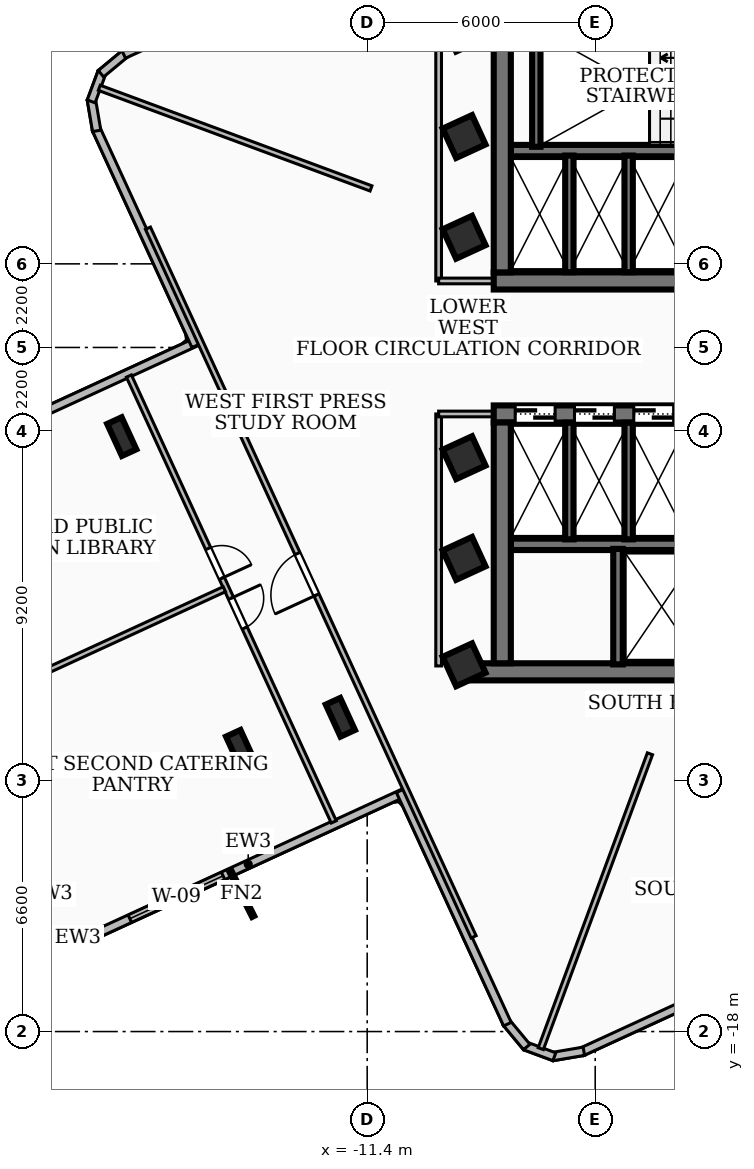
"""IFC4 building model, lengths in metres.
Left out: names, types, materials, properties, quantities, classifications, styles, units other than length and angle.
Written with IfcOpenShell. Run it as: python <this file> out.ifc"""

import sys

from ifc_helpers import new_model, si_unit, direction, frame, frame_2d, origin, origin_2d, place, context, subcontext, project, spatial, rectangle, i_section, extrude, element, fill, save


model = new_model("IFC4")
c1 = context("Model", 3, precision=1e-05, world=origin(), true_north=direction((0.0, 1.0)))
c2 = subcontext(c1, "Body", "Model", "MODEL_VIEW")
j1 = project(units=[si_unit("LENGTHUNIT", "METRE"), si_unit("PLANEANGLEUNIT", "RADIAN")], contexts=[c1])
p1 = place(None, origin())
s1 = spatial("IfcSite", under=j1, at=p1, CompositionType="ELEMENT")
p2 = place(p1, origin())
s2 = spatial("IfcBuilding", under=s1, at=p2, CompositionType="ELEMENT")
p3 = place(p2, frame((0.0, 0.0, 184.68)))
s3 = spatial("IfcBuildingStorey", under=s2, at=p3, CompositionType="ELEMENT", Elevation=184.68)
p4 = place(p3, frame((8.07, 1.75, 0.0), z_axis=(0.0, 0.0, 1.0), x_axis=(-1.0, 0.0, 0.0)))
e1 = element("IfcWall", 1, at=p4, inside=s3, PredefinedType="SHEAR", context=c2, shape_type="SweptSolid", body=[
    extrude(rectangle(XDim=16.14, YDim=0.45, at=frame_2d((8.07, 0.0))), origin(), (0.0, 0.0, 1.0), 3.34),
])
p5 = place(p4, frame((7.45, 0.0, 0.0)))
e2 = element("IfcOpeningElement", 2, at=p5, cuts=e1, PredefinedType="OPENING", context=c2, shape_type="SweptSolid", body=[
    extrude(rectangle(XDim=1.0, YDim=2.1, at=frame_2d((0.5, 1.05))), frame((0.0, 0.235, 0.0), z_axis=(0.0, -1.0, 0.0), x_axis=(1.0, 0.0, 0.0)), (0.0, 0.0, 1.0), 0.47),
])
p6 = place(p4, frame((3.4, 0.0, 0.0)))
e3 = element("IfcOpeningElement", 3, at=p6, cuts=e1, PredefinedType="OPENING", context=c2, shape_type="SweptSolid", body=[
    extrude(rectangle(XDim=0.9, YDim=2.06, at=frame_2d((0.45, 1.03))), frame((0.0, 0.235, 0.0), z_axis=(0.0, -1.0, 0.0), x_axis=(1.0, 0.0, 0.0)), (0.0, 0.0, 1.0), 0.47),
])
p7 = place(p4, frame((1.1, 0.0, 0.0)))
e4 = element("IfcOpeningElement", 4, at=p7, cuts=e1, PredefinedType="OPENING", context=c2, shape_type="SweptSolid", body=[
    extrude(rectangle(XDim=0.9, YDim=2.06, at=frame_2d((0.45, 1.03))), frame((0.0, 0.235, 0.0), z_axis=(0.0, -1.0, 0.0), x_axis=(1.0, 0.0, 0.0)), (0.0, 0.0, 1.0), 0.47),
])
p8 = place(p3, frame((-7.845, 1.975, 0.0), z_axis=(0.0, 0.0, 1.0), x_axis=(0.0, 1.0, 0.0)))
e5 = element("IfcWall", 5, at=p8, inside=s3, PredefinedType="SHEAR", context=c2, shape_type="SweptSolid", body=[
    extrude(rectangle(XDim=6.335, YDim=0.45, at=frame_2d((3.167, 0.0))), origin(), (0.0, 0.0, 1.0), 3.34),
])
p9 = place(p3, frame((7.62, 5.18, 0.0), z_axis=(0.0, 0.0, 1.0), x_axis=(-1.0, 0.0, 0.0)))
e6 = element("IfcWall", 6, at=p9, inside=s3, PredefinedType="SOLIDWALL", context=c2, shape_type="SweptSolid", body=[
    extrude(rectangle(XDim=15.24, YDim=0.3, at=frame_2d((7.62, 0.0))), origin(), (0.0, 0.0, 1.0), 3.34),
])
p10 = place(p9, frame((5.77, 0.0, 0.0)))
e7 = element("IfcOpeningElement", 7, at=p10, cuts=e6, PredefinedType="OPENING", context=c2, shape_type="SweptSolid", body=[
    extrude(rectangle(XDim=1.1, YDim=2.15, at=frame_2d((0.55, 1.075))), frame((0.0, 0.16, 0.0), z_axis=(0.0, -1.0, 0.0), x_axis=(1.0, 0.0, 0.0)), (0.0, 0.0, 1.0), 0.32),
])
p11 = place(p9, frame((2.97, 0.0, 0.0)))
e8 = element("IfcOpeningElement", 8, at=p11, cuts=e6, PredefinedType="OPENING", context=c2, shape_type="SweptSolid", body=[
    extrude(rectangle(XDim=1.1, YDim=2.15, at=frame_2d((0.55, 1.075))), frame((0.0, 0.16, 0.0), z_axis=(0.0, -1.0, 0.0), x_axis=(1.0, 0.0, 0.0)), (0.0, 0.0, 1.0), 0.32),
])
p12 = place(p9, frame((7.97, 0.0, 0.0)))
e9 = element("IfcOpeningElement", 9, at=p12, cuts=e6, PredefinedType="OPENING", context=c2, shape_type="SweptSolid", body=[
    extrude(rectangle(XDim=1.0, YDim=2.1, at=frame_2d((0.5, 1.05))), frame((0.0, 0.16, 0.0), z_axis=(0.0, -1.0, 0.0), x_axis=(1.0, 0.0, 0.0)), (0.0, 0.0, 1.0), 0.32),
])
p13 = place(p3, frame((8.78, -8.535, 0.0), z_axis=(0.0, 0.0, 1.0), x_axis=(-1.0, 0.0, 0.0)))
e10 = element("IfcWall", 10, at=p13, inside=s3, PredefinedType="SHEAR", context=c2, shape_type="SweptSolid", body=[
    extrude(rectangle(XDim=17.56, YDim=0.45, at=frame_2d((8.78, 0.0))), origin(), (0.0, 0.0, 1.0), 3.34),
])
p14 = place(p3, frame((-8.07, -1.75, 0.0), z_axis=(0.0, 0.0, 1.0), x_axis=(1.0, 0.0, 0.0)))
e11 = element("IfcWall", 11, at=p14, inside=s3, PredefinedType="SHEAR", context=c2, shape_type="SweptSolid", body=[
    extrude(rectangle(XDim=16.14, YDim=0.45, at=frame_2d((8.07, 0.0))), origin(), (0.0, 0.0, 1.0), 3.34),
])
p15 = place(p14, frame((7.45, 0.0, 0.0)))
e12 = element("IfcOpeningElement", 12, at=p15, cuts=e11, PredefinedType="OPENING", context=c2, shape_type="SweptSolid", body=[
    extrude(rectangle(XDim=1.0, YDim=2.1, at=frame_2d((0.5, 1.05))), frame((0.0, 0.235, 0.0), z_axis=(0.0, -1.0, 0.0), x_axis=(1.0, 0.0, 0.0)), (0.0, 0.0, 1.0), 0.47),
])
p16 = place(p14, frame((12.65, 0.0, 0.0)))
e13 = element("IfcOpeningElement", 13, at=p16, cuts=e11, PredefinedType="OPENING", context=c2, shape_type="SweptSolid", body=[
    extrude(rectangle(XDim=0.9, YDim=2.06, at=frame_2d((0.45, 1.03))), frame((0.0, 0.235, 0.0), z_axis=(0.0, -1.0, 0.0), x_axis=(1.0, 0.0, 0.0)), (0.0, 0.0, 1.0), 0.47),
])
p17 = place(p14, frame((0.565, 0.0, 0.0)))
e14 = element("IfcOpeningElement", 14, at=p17, cuts=e11, PredefinedType="OPENING", context=c2, shape_type="SweptSolid", body=[
    extrude(rectangle(XDim=1.05, YDim=2.15, at=frame_2d((0.525, 1.075))), frame((0.0, 0.235, 0.0), z_axis=(0.0, -1.0, 0.0), x_axis=(1.0, 0.0, 0.0)), (0.0, 0.0, 1.0), 0.47),
])
p18 = place(p14, frame((2.125, 0.0, 0.0)))
e15 = element("IfcOpeningElement", 15, at=p18, cuts=e11, PredefinedType="OPENING", context=c2, shape_type="SweptSolid", body=[
    extrude(rectangle(XDim=1.05, YDim=2.15, at=frame_2d((0.525, 1.075))), frame((0.0, 0.235, 0.0), z_axis=(0.0, -1.0, 0.0), x_axis=(1.0, 0.0, 0.0)), (0.0, 0.0, 1.0), 0.47),
])
p19 = place(p14, frame((3.685, 0.0, 0.0)))
e16 = element("IfcOpeningElement", 16, at=p19, cuts=e11, PredefinedType="OPENING", context=c2, shape_type="SweptSolid", body=[
    extrude(rectangle(XDim=1.05, YDim=2.15, at=frame_2d((0.525, 1.075))), frame((0.0, 0.235, 0.0), z_axis=(0.0, -1.0, 0.0), x_axis=(1.0, 0.0, 0.0)), (0.0, 0.0, 1.0), 0.47),
])
p20 = place(p3, frame((-7.845, -8.31, 0.0), z_axis=(0.0, 0.0, 1.0), x_axis=(0.0, 1.0, 0.0)))
e17 = element("IfcWall", 17, at=p20, inside=s3, PredefinedType="SHEAR", context=c2, shape_type="SweptSolid", body=[
    extrude(rectangle(XDim=6.335, YDim=0.45, at=frame_2d((3.167, 0.0))), origin(), (0.0, 0.0, 1.0), 3.34),
])
p21 = place(p3, frame((-7.62, -5.18, 0.0), z_axis=(0.0, 0.0, 1.0), x_axis=(1.0, 0.0, 0.0)))
e18 = element("IfcWall", 18, at=p21, inside=s3, PredefinedType="SOLIDWALL", context=c2, shape_type="SweptSolid", body=[
    extrude(rectangle(XDim=15.24, YDim=0.3, at=frame_2d((7.62, 0.0))), origin(), (0.0, 0.0, 1.0), 3.34),
])
p22 = place(p21, frame((5.77, 0.0, 0.0)))
e19 = element("IfcOpeningElement", 19, at=p22, cuts=e18, PredefinedType="OPENING", context=c2, shape_type="SweptSolid", body=[
    extrude(rectangle(XDim=1.1, YDim=2.15, at=frame_2d((0.55, 1.075))), frame((0.0, 0.16, 0.0), z_axis=(0.0, -1.0, 0.0), x_axis=(1.0, 0.0, 0.0)), (0.0, 0.0, 1.0), 0.32),
])
p23 = place(p21, frame((7.97, 0.0, 0.0)))
e20 = element("IfcOpeningElement", 20, at=p23, cuts=e18, PredefinedType="OPENING", context=c2, shape_type="SweptSolid", body=[
    extrude(rectangle(XDim=1.0, YDim=2.1, at=frame_2d((0.5, 1.05))), frame((0.0, 0.16, 0.0), z_axis=(0.0, -1.0, 0.0), x_axis=(1.0, 0.0, 0.0)), (0.0, 0.0, 1.0), 0.32),
])
p24 = place(p3, frame((-6.95, 5.28, 0.0), z_axis=(0.0, 0.0, 1.0), x_axis=(0.0, 1.0, 0.0)))
e21 = element("IfcWall", 21, at=p24, inside=s3, PredefinedType="SOLIDWALL", context=c2, shape_type="SweptSolid", body=[
    extrude(rectangle(XDim=3.06, YDim=0.22, at=frame_2d((1.53, 0.0))), origin(), (0.0, 0.0, 1.0), 3.34),
])
p25 = place(p3, frame((-4.8, -8.34, 0.0), z_axis=(0.0, 0.0, 1.0), x_axis=(0.0, 1.0, 0.0)))
e22 = element("IfcWall", 22, at=p25, inside=s3, PredefinedType="SOLIDWALL", context=c2, shape_type="SweptSolid", body=[
    extrude(rectangle(XDim=3.04, YDim=0.25, at=frame_2d((1.52, 0.0))), origin(), (0.0, 0.0, 1.0), 3.34),
])
for number, where, z_axis, x_axis in (
    (23, (-6.08, 1.98, 0.0), (0.0, 0.0, 1.0), (0.0, 1.0, 0.0)),
    (24, (-4.52, 1.98, 0.0), (0.0, 0.0, 1.0), (0.0, 1.0, 0.0)),
    (25, (-6.08, -5.05, 0.0), (0.0, 0.0, 1.0), (0.0, 1.0, 0.0)),
    (26, (-4.52, -5.05, 0.0), (0.0, 0.0, 1.0), (0.0, 1.0, 0.0)),
):
    element("IfcWall", number, at=place(p3, frame(where, z_axis=z_axis, x_axis=x_axis)), inside=s3, PredefinedType="SOLIDWALL", context=c2, shape_type="SweptSolid", body=[
        extrude(rectangle(XDim=3.07, YDim=0.22, at=frame_2d((1.535, 0.0))), origin(), (0.0, 0.0, 1.0), 3.34),
    ])
for number, where, z_axis, x_axis in (
    (27, (-8.85, -5.55, 0.0), (0.0, 0.0, 1.0), (0.909, 0.418, 0.0)),
    (28, (-8.85, -2.9, 0.0), (0.0, 0.0, 1.0), (0.909, 0.418, 0.0)),
    (29, (-8.85, 2.9, 0.0), (0.0, 0.0, 1.0), (0.909, 0.418, 0.0)),
    (30, (-8.85, 5.55, 0.0), (0.0, 0.0, 1.0), (0.909, 0.418, 0.0)),
    (31, (-8.85, -8.35, 0.0), (0.0, 0.0, 1.0), (0.909, 0.418, 0.0)),
):
    element("IfcColumn", number, at=place(p3, frame(where, z_axis=z_axis, x_axis=x_axis)), inside=s3, PredefinedType="COLUMN", context=c2, shape_type="SweptSolid", body=[
        extrude(rectangle(XDim=0.85, YDim=0.85, at=origin_2d()), origin(), (0.0, 0.0, 1.0), 3.6),
    ])
for number, where, z_axis, x_axis in (
    (32, (-17.858, -2.346, 0.0), (0.0, 0.0, 1.0), (0.909, 0.418, 0.0)),
    (33, (-12.106, -9.731, 0.0), (0.0, 0.0, 1.0), (0.909, 0.418, 0.0)),
    (34, (-14.731, -10.573, 0.0), (0.0, 0.0, 1.0), (0.909, 0.418, 0.0)),
):
    element("IfcColumn", number, at=place(p3, frame(where, z_axis=z_axis, x_axis=x_axis)), inside=s3, PredefinedType="COLUMN", context=c2, shape_type="SweptSolid", body=[
        extrude(i_section(OverallWidth=0.418, OverallDepth=0.927, WebThickness=0.019, FlangeThickness=0.032, at=origin_2d()), origin(), (0.0, 0.0, 1.0), 3.6),
    ])
p26 = place(p3, frame((-10.415, -11.708, 0.0), z_axis=(0.0, 0.0, 1.0), x_axis=(-0.908668829641, -0.417517614047, 0.0)))
e35 = element("IfcWall", 35, at=p26, inside=s3, PredefinedType="SOLIDWALL", context=c2, shape_type="SweptSolid", body=[
    extrude(rectangle(XDim=9.058, YDim=0.22, at=frame_2d((4.529, 0.0))), origin(), (0.0, 0.0, 1.0), 3.34),
])
p27 = place(p26, frame((5.258, 0.0, 0.85)))
e36 = element("IfcOpeningElement", 36, at=p27, cuts=e35, PredefinedType="OPENING", context=c2, shape_type="SweptSolid", body=[
    extrude(rectangle(XDim=2.7, YDim=1.65, at=frame_2d((1.35, 0.825))), frame((0.0, 0.12, 0.0), z_axis=(0.0, -1.0, 0.0), x_axis=(1.0, 0.0, 0.0)), (0.0, 0.0, 1.0), 0.24),
])
p28 = place(p3, frame((-18.598, -15.476, 0.0), z_axis=(0.0, 0.0, 1.0), x_axis=(-0.985859228908, -0.167575597201, 0.0)))
e37 = element("IfcWall", 37, at=p28, inside=s3, PredefinedType="SOLIDWALL", context=c2, shape_type="SweptSolid", body=[
    extrude(rectangle(XDim=0.835, YDim=0.22, at=frame_2d((0.417, 0.0))), origin(), (0.0, 0.0, 1.0), 3.34),
])
p29 = place(p3, frame((-19.373, -15.621, 0.0), z_axis=(0.0, 0.0, 1.0), x_axis=(-0.937294412261, 0.348538641681, 0.0)))
e38 = element("IfcWall", 38, at=p29, inside=s3, PredefinedType="SOLIDWALL", context=c2, shape_type="SweptSolid", body=[
    extrude(rectangle(XDim=0.818, YDim=0.22, at=frame_2d((0.409, 0.0))), origin(), (0.0, 0.0, 1.0), 3.34),
])
p30 = place(p3, frame((-24.099, -3.623, 0.0), z_axis=(0.0, 0.0, 1.0), x_axis=(0.908673527814, 0.417507388977, 0.0)))
e39 = element("IfcWall", 39, at=p30, inside=s3, PredefinedType="SOLIDWALL", context=c2, shape_type="SweptSolid", body=[
    extrude(rectangle(XDim=9.059, YDim=0.22, at=frame_2d((4.529, 0.0))), origin(), (0.0, 0.0, 1.0), 3.34),
])
p31 = place(p30, frame((1.1, 0.0, 0.85)))
e40 = element("IfcOpeningElement", 40, at=p31, cuts=e39, PredefinedType="OPENING", context=c2, shape_type="SweptSolid", body=[
    extrude(rectangle(XDim=2.1, YDim=2.0, at=frame_2d((1.05, 1.0))), frame((0.0, 0.12, 0.0), z_axis=(0.0, -1.0, 0.0), x_axis=(1.0, 0.0, 0.0)), (0.0, 0.0, 1.0), 0.24),
])
p32 = place(p3, frame((-15.911, 0.042, 0.0), z_axis=(0.0, 0.0, 1.0), x_axis=(-0.417479344719, 0.908686412759, 0.0)))
e41 = element("IfcWall", 41, at=p32, inside=s3, PredefinedType="SOLIDWALL", context=c2, shape_type="SweptSolid", body=[
    extrude(rectangle(XDim=6.278, YDim=0.22, at=frame_2d((3.139, 0.0))), origin(), (0.0, 0.0, 1.0), 3.34),
])
p33 = place(p3, frame((-18.518, 5.699, 0.0), z_axis=(0.0, 0.0, 1.0), x_axis=(-0.167382556682, 0.985892022342, 0.0)))
e42 = element("IfcWall", 42, at=p33, inside=s3, PredefinedType="SOLIDWALL", context=c2, shape_type="SweptSolid", body=[
    extrude(rectangle(XDim=0.836, YDim=0.22, at=frame_2d((0.418, 0.0))), origin(), (0.0, 0.0, 1.0), 3.34),
])
p34 = place(p3, frame((-18.663, 6.475, 0.0), z_axis=(0.0, 0.0, 1.0), x_axis=(0.348538641681, 0.937294412261, 0.0)))
e43 = element("IfcWall", 43, at=p34, inside=s3, PredefinedType="SOLIDWALL", context=c2, shape_type="SweptSolid", body=[
    extrude(rectangle(XDim=0.818, YDim=0.22, at=frame_2d((0.409, 0.0))), origin(), (0.0, 0.0, 1.0), 3.34),
])
p35 = place(p3, frame((-18.406, 7.203, 0.0), z_axis=(0.0, 0.0, 1.0), x_axis=(0.769323077261, 0.638859924235, 0.0)))
e44 = element("IfcWall", 44, at=p35, inside=s3, PredefinedType="SOLIDWALL", context=c2, shape_type="SweptSolid", body=[
    extrude(rectangle(XDim=0.835, YDim=0.22, at=frame_2d((0.417, 0.0))), origin(), (0.0, 0.0, 1.0), 3.34),
])
p36 = place(p3, frame((-17.806, 7.71, 0.0), z_axis=(0.0, 0.0, 1.0), x_axis=(0.908646468859, 0.417566275734, 0.0)))
e45 = element("IfcWall", 45, at=p36, inside=s3, PredefinedType="SOLIDWALL", context=c2, shape_type="SweptSolid", body=[
    extrude(rectangle(XDim=6.758, YDim=0.22, at=frame_2d((3.379, 0.0))), origin(), (0.0, 0.0, 1.0), 3.34),
])
p37 = place(p3, frame((-0.042, -15.911, 0.0), z_axis=(0.0, 0.0, 1.0), x_axis=(-0.908686412759, -0.417479344719, 0.0)))
e46 = element("IfcWall", 46, at=p37, inside=s3, PredefinedType="SOLIDWALL", context=c2, shape_type="SweptSolid", body=[
    extrude(rectangle(XDim=6.278, YDim=0.22, at=frame_2d((3.139, 0.0))), origin(), (0.0, 0.0, 1.0), 3.34),
])
p38 = place(p3, frame((-5.699, -18.518, 0.0), z_axis=(0.0, 0.0, 1.0), x_axis=(-0.985892022342, -0.167382556682, 0.0)))
e47 = element("IfcWall", 47, at=p38, inside=s3, PredefinedType="SOLIDWALL", context=c2, shape_type="SweptSolid", body=[
    extrude(rectangle(XDim=0.836, YDim=0.22, at=frame_2d((0.418, 0.0))), origin(), (0.0, 0.0, 1.0), 3.34),
])
p39 = place(p3, frame((-6.475, -18.663, 0.0), z_axis=(0.0, 0.0, 1.0), x_axis=(-0.937294412261, 0.348538641681, 0.0)))
e48 = element("IfcWall", 48, at=p39, inside=s3, PredefinedType="SOLIDWALL", context=c2, shape_type="SweptSolid", body=[
    extrude(rectangle(XDim=0.818, YDim=0.22, at=frame_2d((0.409, 0.0))), origin(), (0.0, 0.0, 1.0), 3.34),
])
p40 = place(p3, frame((-7.203, -18.406, 0.0), z_axis=(0.0, 0.0, 1.0), x_axis=(-0.638859924235, 0.769323077261, 0.0)))
e49 = element("IfcWall", 49, at=p40, inside=s3, PredefinedType="SOLIDWALL", context=c2, shape_type="SweptSolid", body=[
    extrude(rectangle(XDim=0.835, YDim=0.22, at=frame_2d((0.417, 0.0))), origin(), (0.0, 0.0, 1.0), 3.34),
])
p41 = place(p3, frame((-7.71, -17.806, 0.0), z_axis=(0.0, 0.0, 1.0), x_axis=(-0.417566275734, 0.908646468859, 0.0)))
e50 = element("IfcWall", 50, at=p41, inside=s3, PredefinedType="SOLIDWALL", context=c2, shape_type="SweptSolid", body=[
    extrude(rectangle(XDim=6.758, YDim=0.22, at=frame_2d((3.379, 0.0))), origin(), (0.0, 0.0, 1.0), 3.34),
])
p42 = place(p3, frame((-9.52, 1.75, 0.0), z_axis=(0.0, 0.0, 1.0), x_axis=(0.0, 1.0, 0.0)))
e51 = element("IfcWall", 51, at=p42, inside=s3, PredefinedType="PARTITIONING", context=c2, shape_type="SweptSolid", body=[
    extrude(rectangle(XDim=6.63, YDim=0.15, at=frame_2d((3.315, 0.0))), origin(), (0.0, 0.0, 1.0), 3.34),
])
p43 = place(p3, frame((-7.85, 1.75, 0.0), z_axis=(0.0, 0.0, 1.0), x_axis=(-1.0, 0.0, 0.0)))
e52 = element("IfcWall", 52, at=p43, inside=s3, PredefinedType="PARTITIONING", context=c2, shape_type="SweptSolid", body=[
    extrude(rectangle(XDim=1.67, YDim=0.15, at=frame_2d((0.835, 0.0))), origin(), (0.0, 0.0, 1.0), 2.57),
])
p44 = place(p3, frame((-9.52, -8.38, 0.0), z_axis=(0.0, 0.0, 1.0), x_axis=(0.0, 1.0, 0.0)))
e53 = element("IfcWall", 53, at=p44, inside=s3, PredefinedType="PARTITIONING", context=c2, shape_type="SweptSolid", body=[
    extrude(rectangle(XDim=6.63, YDim=0.15, at=frame_2d((3.315, 0.0))), origin(), (0.0, 0.0, 1.0), 2.644),
])
p45 = place(p3, frame((-7.85, -1.75, 0.0), z_axis=(0.0, 0.0, 1.0), x_axis=(-1.0, 0.0, 0.0)))
e54 = element("IfcWall", 54, at=p45, inside=s3, PredefinedType="PARTITIONING", context=c2, shape_type="SweptSolid", body=[
    extrude(rectangle(XDim=1.67, YDim=0.15, at=frame_2d((0.835, 0.0))), origin(), (0.0, 0.0, 1.0), 2.57),
])
p46 = place(p3, frame((-11.3, 4.185, 0.0), z_axis=(0.0, 0.0, 1.0), x_axis=(-0.937797421925, 0.347182942311, 0.0)))
e55 = element("IfcWall", 55, at=p46, inside=s3, PredefinedType="PARTITIONING", context=c2, shape_type="SweptSolid", body=[
    extrude(rectangle(XDim=7.624, YDim=0.145, at=frame_2d((3.812, 0.0))), origin(), (0.0, 0.0, 1.0), 3.34),
])
p47 = place(p3, frame((-3.959, -10.691, 0.0), z_axis=(0.0, 0.0, 1.0), x_axis=(-0.347243238044, -0.937775097576, 0.0)))
e56 = element("IfcWall", 56, at=p47, inside=s3, PredefinedType="PARTITIONING", context=c2, shape_type="SweptSolid", body=[
    extrude(rectangle(XDim=8.274, YDim=0.145, at=frame_2d((4.137, 0.0))), origin(), (0.0, 0.0, 1.0), 3.34),
])
p48 = place(p3, frame((-8.6, -15.508, 0.0), z_axis=(0.0, 0.0, 1.0), x_axis=(-0.41757132443, 0.908644148726, 0.0)))
e57 = element("IfcWall", 57, at=p48, inside=s3, PredefinedType="PARTITIONING", context=c2, shape_type="SweptSolid", body=[
    extrude(rectangle(XDim=20.521, YDim=0.145, at=frame_2d((10.26, 0.0))), origin(), (0.0, 0.0, 1.0), 2.644),
])
p49 = place(p48, frame((9.9, 0.0, 0.0)))
e58 = element("IfcOpeningElement", 58, at=p49, cuts=e57, PredefinedType="OPENING", context=c2, shape_type="SweptSolid", body=[
    extrude(rectangle(XDim=1.2, YDim=2.1, at=frame_2d((0.6, 1.05))), frame((0.0, 0.083, 0.0), z_axis=(0.0, -1.0, 0.0), x_axis=(1.0, 0.0, 0.0)), (0.0, 0.0, 1.0), 0.165),
])
p50 = place(p3, frame((-15.159, -6.361, 0.0), z_axis=(0.0, 0.0, 1.0), x_axis=(-0.90866370778, -0.417528760881, 0.0)))
e59 = element("IfcWall", 59, at=p50, inside=s3, PredefinedType="PARTITIONING", context=c2, shape_type="SweptSolid", body=[
    extrude(rectangle(XDim=8.385, YDim=0.145, at=frame_2d((4.192, 0.0))), origin(), (0.0, 0.0, 1.0), 3.34),
])
p51 = place(p3, frame((-17.67, -0.752, 0.0), z_axis=(0.0, 0.0, 1.0), x_axis=(0.41749974953, -0.908677037864, 0.0)))
e60 = element("IfcWall", 60, at=p51, inside=s3, PredefinedType="PARTITIONING", context=c2, shape_type="SweptSolid", body=[
    extrude(rectangle(XDim=12.91, YDim=0.145, at=frame_2d((6.455, 0.0))), origin(), (0.0, 0.0, 1.0), 2.644),
])
p52 = place(p51, frame((4.995, 0.0, 0.0)))
e61 = element("IfcOpeningElement", 61, at=p52, cuts=e60, PredefinedType="OPENING", context=c2, shape_type="SweptSolid", body=[
    extrude(rectangle(XDim=0.86, YDim=2.04, at=frame_2d((0.43, 1.02))), frame((0.0, 0.083, 0.0), z_axis=(0.0, -1.0, 0.0), x_axis=(1.0, 0.0, 0.0)), (0.0, 0.0, 1.0), 0.165),
])
p53 = place(p51, frame((6.435, 0.0, 0.0)))
e62 = element("IfcOpeningElement", 62, at=p53, cuts=e60, PredefinedType="OPENING", context=c2, shape_type="SweptSolid", body=[
    extrude(rectangle(XDim=0.86, YDim=2.04, at=frame_2d((0.43, 1.02))), frame((0.0, 0.083, 0.0), z_axis=(0.0, -1.0, 0.0), x_axis=(1.0, 0.0, 0.0)), (0.0, 0.0, 1.0), 0.165),
])
p54 = place(p27, origin())
e63 = element("IfcWindow", 63, at=p54, inside=s3, PartitioningType="SINGLE_PANEL", PredefinedType="WINDOW", context=c2, shape_type="SweptSolid", body=[
    extrude(rectangle(XDim=2.7, YDim=1.65, at=frame_2d((1.35, 0.825))), frame((0.0, 0.03, 0.0), z_axis=(0.0, -1.0, 0.0), x_axis=(1.0, 0.0, 0.0)), (0.0, 0.0, 1.0), 0.06),
])
fill(e36, e63)
p55 = place(p17, origin())
e64 = element("IfcDoor", 64, at=p55, inside=s3, OperationType="DOUBLE_DOOR_SLIDING", PredefinedType="DOOR", context=c2, shape_type="SweptSolid", body=[
    extrude(rectangle(XDim=1.05, YDim=2.15, at=frame_2d((0.525, 1.075))), frame((0.0, 0.025, 0.0), z_axis=(0.0, -1.0, 0.0), x_axis=(1.0, 0.0, 0.0)), (0.0, 0.0, 1.0), 0.05),
])
fill(e14, e64)
p56 = place(p18, origin())
e65 = element("IfcDoor", 65, at=p56, inside=s3, OperationType="DOUBLE_DOOR_SLIDING", PredefinedType="DOOR", context=c2, shape_type="SweptSolid", body=[
    extrude(rectangle(XDim=1.05, YDim=2.15, at=frame_2d((0.525, 1.075))), frame((0.0, 0.025, 0.0), z_axis=(0.0, -1.0, 0.0), x_axis=(1.0, 0.0, 0.0)), (0.0, 0.0, 1.0), 0.05),
])
fill(e15, e65)
p57 = place(p19, origin())
e66 = element("IfcDoor", 66, at=p57, inside=s3, OperationType="DOUBLE_DOOR_SLIDING", PredefinedType="DOOR", context=c2, shape_type="SweptSolid", body=[
    extrude(rectangle(XDim=1.05, YDim=2.15, at=frame_2d((0.525, 1.075))), frame((0.0, 0.025, 0.0), z_axis=(0.0, -1.0, 0.0), x_axis=(1.0, 0.0, 0.0)), (0.0, 0.0, 1.0), 0.05),
])
fill(e16, e66)
p58 = place(p49, origin())
e67 = element("IfcDoor", 67, at=p58, inside=s3, OperationType="SINGLE_SWING_LEFT", PredefinedType="DOOR", context=c2, shape_type="SweptSolid", body=[
    extrude(rectangle(XDim=1.2, YDim=2.1, at=frame_2d((0.6, 1.05))), frame((0.0, 0.025, 0.0), z_axis=(0.0, -1.0, 0.0), x_axis=(1.0, 0.0, 0.0)), (0.0, 0.0, 1.0), 0.05),
])
fill(e58, e67)
p59 = place(p52, origin())
e68 = element("IfcDoor", 68, at=p59, inside=s3, OperationType="SINGLE_SWING_RIGHT", PredefinedType="DOOR", context=c2, shape_type="SweptSolid", body=[
    extrude(rectangle(XDim=0.86, YDim=2.04, at=frame_2d((0.43, 1.02))), frame((0.0, 0.025, 0.0), z_axis=(0.0, -1.0, 0.0), x_axis=(1.0, 0.0, 0.0)), (0.0, 0.0, 1.0), 0.05),
])
fill(e61, e68)
p60 = place(p53, origin())
e69 = element("IfcDoor", 69, at=p60, inside=s3, OperationType="SINGLE_SWING_LEFT", PredefinedType="DOOR", context=c2, shape_type="SweptSolid", body=[
    extrude(rectangle(XDim=0.86, YDim=2.04, at=frame_2d((0.43, 1.02))), frame((0.0, 0.025, 0.0), z_axis=(0.0, -1.0, 0.0), x_axis=(1.0, 0.0, 0.0)), (0.0, 0.0, 1.0), 0.05),
])
fill(e62, e69)
save(model, sys.argv[1])
